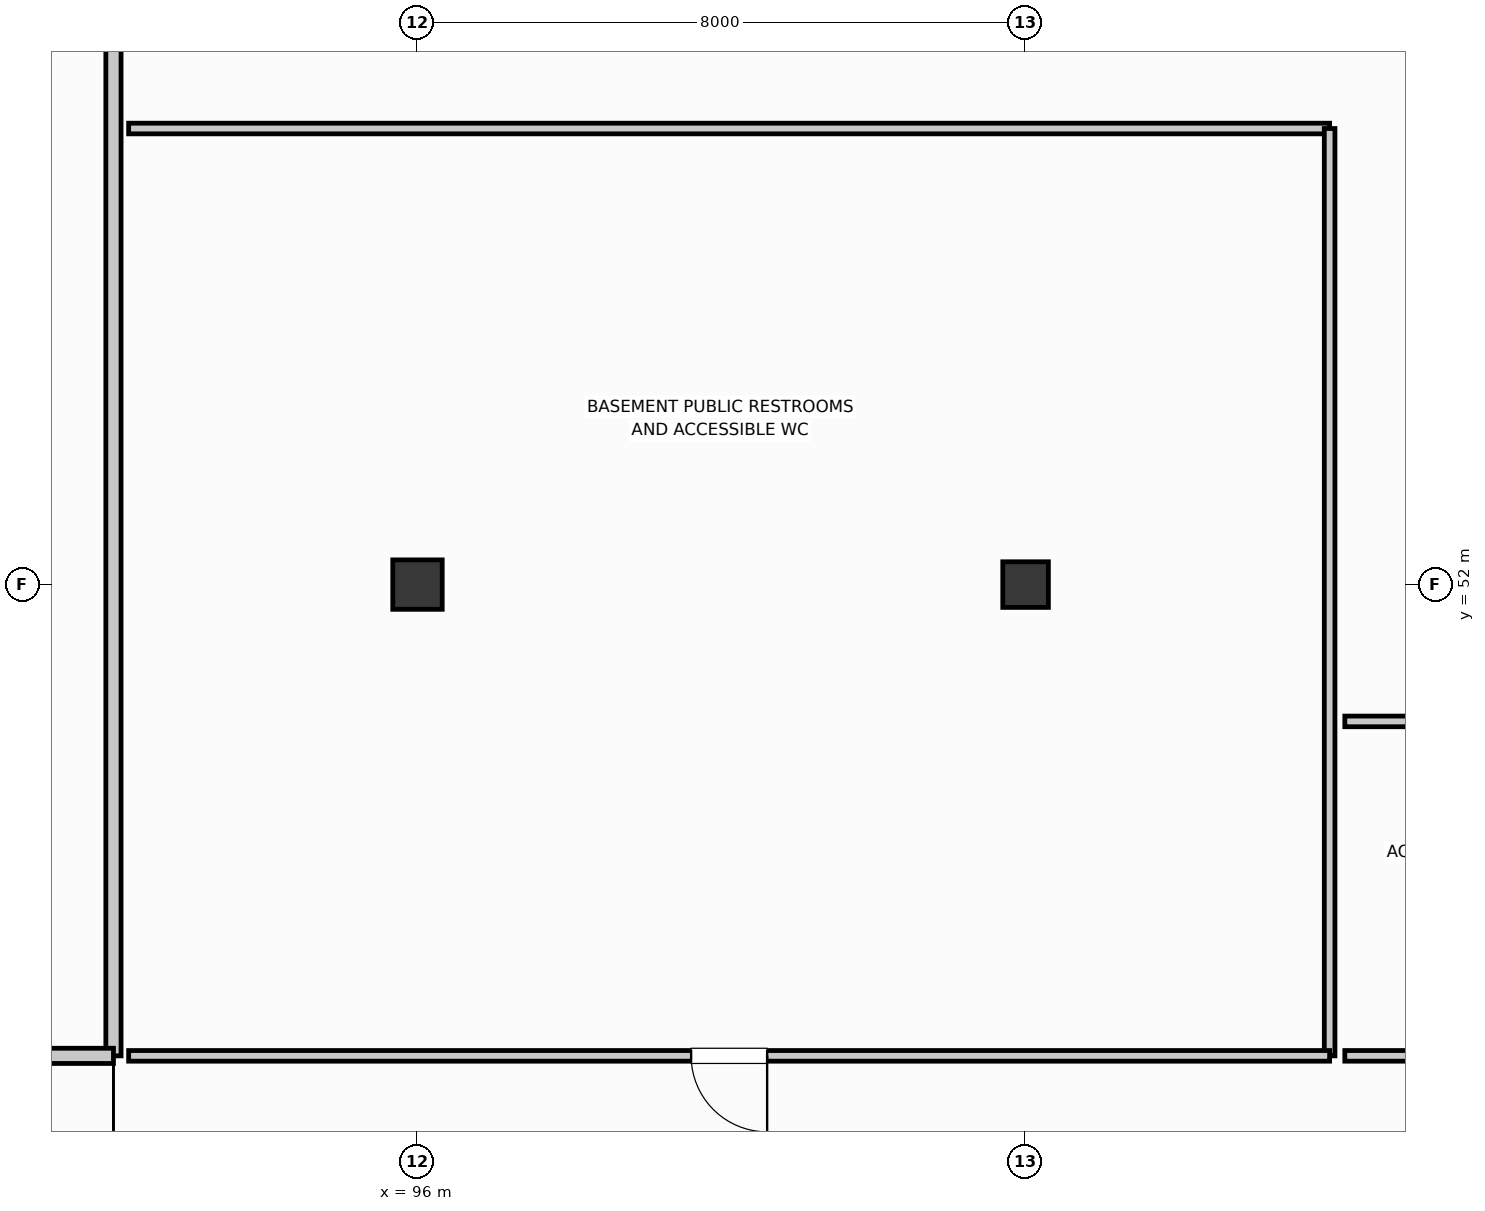
"""IFC4 building model, lengths in metres.
Left out: names, types, materials, properties, quantities, classifications, styles, units other than length and angle.
Written with IfcOpenShell. Run it as: python <this file> out.ifc"""

import sys

from ifc_helpers import new_model, si_unit, direction, frame, frame_2d, origin, origin_2d, place, context, subcontext, project, spatial, rectangle, extrude, element, fill, save


model = new_model("IFC4")
c1 = context("Model", 3, precision=1e-05, world=origin(), true_north=direction((0.0, 1.0)))
c2 = subcontext(c1, "Body", "Model", "MODEL_VIEW")
j1 = project(units=[si_unit("LENGTHUNIT", "METRE"), si_unit("PLANEANGLEUNIT", "RADIAN")], contexts=[c1])
p1 = place(None, origin())
s1 = spatial("IfcSite", under=j1, at=p1, CompositionType="ELEMENT")
p2 = place(p1, origin())
s2 = spatial("IfcBuilding", under=s1, at=p2, CompositionType="ELEMENT")
p3 = place(p2, frame((0.0, 0.0, -5.4)))
s3 = spatial("IfcBuildingStorey", under=s2, at=p3, CompositionType="ELEMENT", Elevation=-5.4)
p4 = place(p3, frame((96.0, 52.0, 0.0), z_axis=(0.0, 0.0, 1.0), x_axis=(1.0, 0.0, 0.0)))
e1 = element("IfcColumn", 1, at=p4, inside=s3, PredefinedType="COLUMN", context=c2, shape_type="SweptSolid", body=[
    extrude(rectangle(XDim=0.65, YDim=0.65, at=origin_2d()), origin(), (0.0, 0.0, 1.0), 5.4),
])
p5 = place(p3, frame((104.0, 52.0, 0.0), z_axis=(0.0, 0.0, 1.0), x_axis=(1.0, 0.0, 0.0)))
e2 = element("IfcColumn", 2, at=p5, inside=s3, PredefinedType="COLUMN", context=c2, shape_type="SweptSolid", body=[
    extrude(rectangle(XDim=0.6, YDim=0.6, at=origin_2d()), origin(), (0.0, 0.0, 1.0), 5.4),
])
p6 = place(p3, frame((92.0, 85.6, 0.0), z_axis=(0.0, 0.0, 1.0), x_axis=(0.0, -1.0, 0.0)))
e3 = element("IfcWall", 3, at=p6, inside=s3, PredefinedType="PARTITIONING", context=c2, shape_type="SweptSolid", body=[
    extrude(rectangle(XDim=39.8, YDim=0.2, at=frame_2d((19.9, 0.0))), origin(), (0.0, 0.0, 1.0), 4.215),
])
p7 = place(p3, frame((92.0, 45.8, 0.0), z_axis=(0.0, 0.0, 1.0), x_axis=(-1.0, 0.0, 0.0)))
e4 = element("IfcWall", 4, at=p7, inside=s3, PredefinedType="PARTITIONING", context=c2, shape_type="SweptSolid", body=[
    extrude(rectangle(XDim=19.08, YDim=0.2, at=frame_2d((9.54, 0.0))), origin(), (0.0, 0.0, 1.0), 4.565),
])
p8 = place(p7, frame((8.64, 0.0, 0.0)))
e5 = element("IfcOpeningElement", 5, at=p8, cuts=e4, PredefinedType="OPENING", context=c2, shape_type="SweptSolid", body=[
    extrude(rectangle(XDim=1.8, YDim=2.25, at=frame_2d((0.9, 1.125))), frame((0.0, 0.11, 0.0), z_axis=(0.0, -1.0, 0.0), x_axis=(1.0, 0.0, 0.0)), (0.0, 0.0, 1.0), 0.22),
])
p9 = place(p3, frame((92.2, 58.0, 0.0), z_axis=(0.0, 0.0, 1.0), x_axis=(1.0, 0.0, 0.0)))
e6 = element("IfcWall", 6, at=p9, inside=s3, PredefinedType="PARTITIONING", context=c2, shape_type="SweptSolid", body=[
    extrude(rectangle(XDim=15.8, YDim=0.14, at=frame_2d((7.9, 0.0))), origin(), (0.0, 0.0, 1.0), 4.575),
])
p10 = place(p3, frame((108.0, 58.0, 0.0), z_axis=(0.0, 0.0, 1.0), x_axis=(0.0, -1.0, 0.0)))
e7 = element("IfcWall", 7, at=p10, inside=s3, PredefinedType="PARTITIONING", context=c2, shape_type="SweptSolid", body=[
    extrude(rectangle(XDim=12.2, YDim=0.14, at=frame_2d((6.1, 0.0))), origin(), (0.0, 0.0, 1.0), 4.275),
])
p11 = place(p3, frame((108.0, 45.8, 0.0), z_axis=(0.0, 0.0, 1.0), x_axis=(-1.0, 0.0, 0.0)))
e8 = element("IfcWall", 8, at=p11, inside=s3, PredefinedType="PARTITIONING", context=c2, shape_type="SweptSolid", body=[
    extrude(rectangle(XDim=15.8, YDim=0.14, at=frame_2d((7.9, 0.0))), origin(), (0.0, 0.0, 1.0), 4.225),
])
p12 = place(p11, frame((7.4, 0.0, 0.0)))
e9 = element("IfcOpeningElement", 9, at=p12, cuts=e8, PredefinedType="OPENING", context=c2, shape_type="SweptSolid", body=[
    extrude(rectangle(XDim=1.0, YDim=2.15, at=frame_2d((0.5, 1.075))), frame((0.0, 0.08, 0.0), z_axis=(0.0, -1.0, 0.0), x_axis=(1.0, 0.0, 0.0)), (0.0, 0.0, 1.0), 0.16),
])
p13 = place(p3, frame((108.2, 50.2, 0.0), z_axis=(0.0, 0.0, 1.0), x_axis=(1.0, 0.0, 0.0)))
e10 = element("IfcWall", 10, at=p13, inside=s3, PredefinedType="PARTITIONING", context=c2, shape_type="SweptSolid", body=[
    extrude(rectangle(XDim=2.88, YDim=0.14, at=frame_2d((1.44, 0.0))), origin(), (0.0, 0.0, 1.0), 5.02),
])
p14 = place(p3, frame((111.08, 45.8, 0.0), z_axis=(0.0, 0.0, 1.0), x_axis=(-1.0, 0.0, 0.0)))
e11 = element("IfcWall", 11, at=p14, inside=s3, PredefinedType="PARTITIONING", context=c2, shape_type="SweptSolid", body=[
    extrude(rectangle(XDim=2.88, YDim=0.14, at=frame_2d((1.44, 0.0))), origin(), (0.0, 0.0, 1.0), 5.02),
])
p15 = place(p14, frame((0.94, 0.0, 0.0)))
e12 = element("IfcOpeningElement", 12, at=p15, cuts=e11, PredefinedType="OPENING", context=c2, shape_type="SweptSolid", body=[
    extrude(rectangle(XDim=1.0, YDim=2.15, at=frame_2d((0.5, 1.075))), frame((0.0, 0.08, 0.0), z_axis=(0.0, -1.0, 0.0), x_axis=(1.0, 0.0, 0.0)), (0.0, 0.0, 1.0), 0.16),
])
p16 = place(p12, origin())
e13 = element("IfcDoor", 13, at=p16, inside=s3, OperationType="SINGLE_SWING_LEFT", PredefinedType="DOOR", context=c2, shape_type="SweptSolid", body=[
    extrude(rectangle(XDim=1.0, YDim=2.15, at=frame_2d((0.5, 1.075))), frame((0.0, 0.025, 0.0), z_axis=(0.0, -1.0, 0.0), x_axis=(1.0, 0.0, 0.0)), (0.0, 0.0, 1.0), 0.05),
])
fill(e9, e13)
save(model, sys.argv[1])
